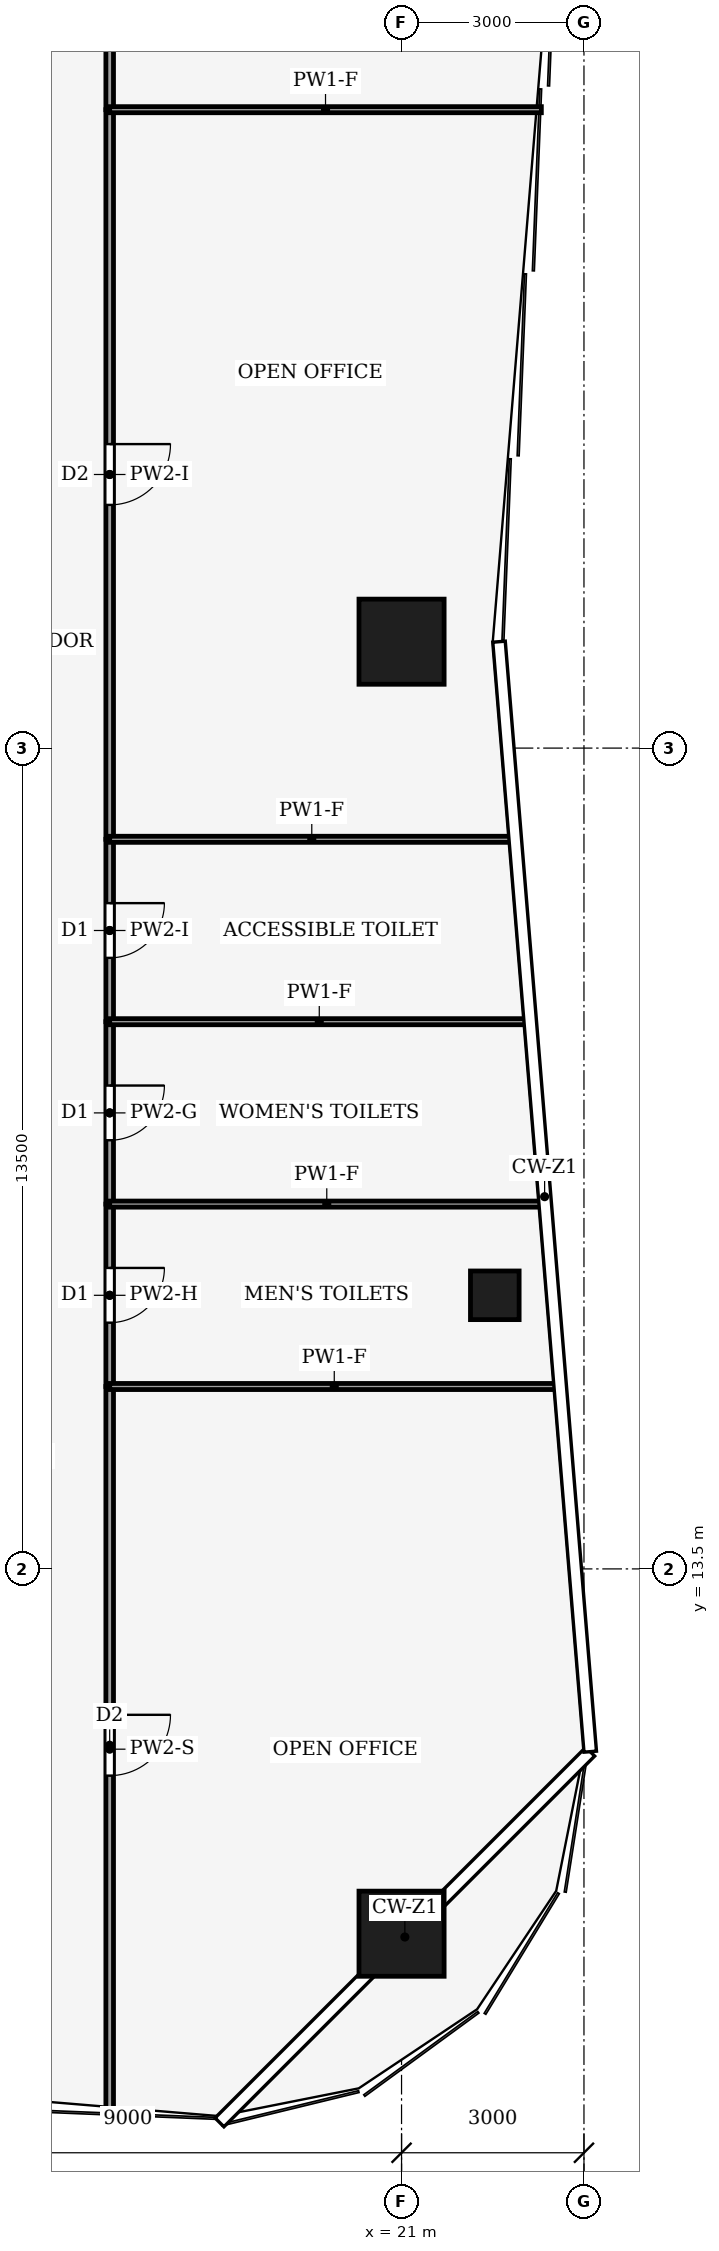
"""IFC4 building model, lengths in metres.
Left out: names, types, materials, properties, quantities, classifications, styles, units other than length and angle.
Written with IfcOpenShell. Run it as: python <this file> out.ifc"""

import sys

from ifc_helpers import new_model, si_unit, direction, frame, frame_2d, origin, origin_2d, place, context, subcontext, project, spatial, rectangle, hollow_rectangle, extrude, element, fill, save


model = new_model("IFC4")
c1 = context("Model", 3, precision=1e-05, world=origin(), true_north=direction((0.0, 1.0)))
c2 = subcontext(c1, "Body", "Model", "MODEL_VIEW")
j1 = project(units=[si_unit("LENGTHUNIT", "METRE"), si_unit("PLANEANGLEUNIT", "RADIAN")], contexts=[c1])
p1 = place(None, origin())
s1 = spatial("IfcSite", under=j1, at=p1, CompositionType="ELEMENT")
p2 = place(p1, origin())
s2 = spatial("IfcBuilding", under=s1, at=p2, CompositionType="ELEMENT")
p3 = place(p2, frame((0.0, 0.0, 78.0)))
s3 = spatial("IfcBuildingStorey", under=s2, at=p3, CompositionType="ELEMENT", Elevation=78.0)
for number, where, z_axis, x_axis in (
    (1, (21.0, 28.75, 0.0), (0.0, 0.0, 1.0), (1.0, 0.0, 0.0)),
    (2, (21.0, 7.5, 0.0), (0.0, 0.0, 1.0), (1.0, 0.0, 0.0)),
):
    element("IfcColumn", number, at=place(p3, frame(where, z_axis=z_axis, x_axis=x_axis)), inside=s3, PredefinedType="COLUMN", context=c2, shape_type="SweptSolid", body=[
        extrude(hollow_rectangle(XDim=1.4, YDim=1.4, WallThickness=0.08, at=origin_2d()), origin(), (0.0, 0.0, 1.0), 4.0),
    ])
p4 = place(p3, frame((22.534, 18.0, 0.0), z_axis=(0.0, 0.0, 1.0), x_axis=(1.0, 0.0, 0.0)))
e3 = element("IfcColumn", 3, at=p4, inside=s3, PredefinedType="COLUMN", context=c2, shape_type="SweptSolid", body=[
    extrude(hollow_rectangle(XDim=0.8, YDim=0.8, WallThickness=0.04, at=origin_2d()), origin(), (0.0, 0.0, 1.0), 4.0),
])
p5 = place(p3, frame((16.2, 16.5, 0.0), z_axis=(0.0, 0.0, 1.0), x_axis=(0.0, -1.0, 0.0)))
e4 = element("IfcWall", 4, at=p5, inside=s3, PredefinedType="PARTITIONING", context=c2, shape_type="SweptSolid", body=[
    extrude(rectangle(XDim=11.93, YDim=0.125, at=frame_2d((5.965, 0.0))), origin(), (0.0, 0.0, 1.0), 3.04),
])
p6 = place(p5, frame((5.4, 0.0, 0.0)))
e5 = element("IfcOpeningElement", 5, at=p6, cuts=e4, PredefinedType="OPENING", context=c2, shape_type="SweptSolid", body=[
    extrude(rectangle(XDim=1.0, YDim=2.1, at=frame_2d((0.5, 1.05))), frame((0.0, 0.073, 0.0), z_axis=(0.0, -1.0, 0.0), x_axis=(1.0, 0.0, 0.0)), (0.0, 0.0, 1.0), 0.145),
])
p7 = place(p3, frame((16.2, 19.5, 0.0), z_axis=(0.0, 0.0, 1.0), x_axis=(0.0, -1.0, 0.0)))
e6 = element("IfcWall", 6, at=p7, inside=s3, PredefinedType="PARTITIONING", context=c2, shape_type="SweptSolid", body=[
    extrude(rectangle(XDim=3.0, YDim=0.125, at=frame_2d((1.5, 0.0))), origin(), (0.0, 0.0, 1.0), 3.14),
])
p8 = place(p7, frame((1.05, 0.0, 0.0)))
e7 = element("IfcOpeningElement", 7, at=p8, cuts=e6, PredefinedType="OPENING", context=c2, shape_type="SweptSolid", body=[
    extrude(rectangle(XDim=0.9, YDim=2.1, at=frame_2d((0.45, 1.05))), frame((0.0, 0.073, 0.0), z_axis=(0.0, -1.0, 0.0), x_axis=(1.0, 0.0, 0.0)), (0.0, 0.0, 1.0), 0.145),
])
p9 = place(p3, frame((16.2, 22.5, 0.0), z_axis=(0.0, 0.0, 1.0), x_axis=(0.0, -1.0, 0.0)))
e8 = element("IfcWall", 8, at=p9, inside=s3, PredefinedType="PARTITIONING", context=c2, shape_type="SweptSolid", body=[
    extrude(rectangle(XDim=3.0, YDim=0.125, at=frame_2d((1.5, 0.0))), origin(), (0.0, 0.0, 1.0), 3.87),
])
p10 = place(p9, frame((1.05, 0.0, 0.0)))
e9 = element("IfcOpeningElement", 9, at=p10, cuts=e8, PredefinedType="OPENING", context=c2, shape_type="SweptSolid", body=[
    extrude(rectangle(XDim=0.9, YDim=2.1, at=frame_2d((0.45, 1.05))), frame((0.0, 0.073, 0.0), z_axis=(0.0, -1.0, 0.0), x_axis=(1.0, 0.0, 0.0)), (0.0, 0.0, 1.0), 0.145),
])
p11 = place(p3, frame((16.2, 25.5, 0.0), z_axis=(0.0, 0.0, 1.0), x_axis=(0.0, -1.0, 0.0)))
e10 = element("IfcWall", 10, at=p11, inside=s3, PredefinedType="PARTITIONING", context=c2, shape_type="SweptSolid", body=[
    extrude(rectangle(XDim=3.0, YDim=0.125, at=frame_2d((1.5, 0.0))), origin(), (0.0, 0.0, 1.0), 3.48),
])
p12 = place(p11, frame((1.05, 0.0, 0.0)))
e11 = element("IfcOpeningElement", 11, at=p12, cuts=e10, PredefinedType="OPENING", context=c2, shape_type="SweptSolid", body=[
    extrude(rectangle(XDim=0.9, YDim=2.1, at=frame_2d((0.45, 1.05))), frame((0.0, 0.073, 0.0), z_axis=(0.0, -1.0, 0.0), x_axis=(1.0, 0.0, 0.0)), (0.0, 0.0, 1.0), 0.145),
])
p13 = place(p3, frame((16.2, 37.5, 0.0), z_axis=(0.0, 0.0, 1.0), x_axis=(0.0, -1.0, 0.0)))
e12 = element("IfcWall", 12, at=p13, inside=s3, PredefinedType="PARTITIONING", context=c2, shape_type="SweptSolid", body=[
    extrude(rectangle(XDim=12.0, YDim=0.125, at=frame_2d((6.0, 0.0))), origin(), (0.0, 0.0, 1.0), 3.48),
])
p14 = place(p13, frame((5.5, 0.0, 0.0)))
e13 = element("IfcOpeningElement", 13, at=p14, cuts=e12, PredefinedType="OPENING", context=c2, shape_type="SweptSolid", body=[
    extrude(rectangle(XDim=1.0, YDim=2.1, at=frame_2d((0.5, 1.05))), frame((0.0, 0.073, 0.0), z_axis=(0.0, -1.0, 0.0), x_axis=(1.0, 0.0, 0.0)), (0.0, 0.0, 1.0), 0.145),
])
p15 = place(p3, frame((16.2, 46.5, 0.0), z_axis=(0.0, 0.0, 1.0), x_axis=(0.0, -1.0, 0.0)))
e14 = element("IfcWall", 14, at=p15, inside=s3, PredefinedType="PARTITIONING", context=c2, shape_type="SweptSolid", body=[
    extrude(rectangle(XDim=9.0, YDim=0.125, at=frame_2d((4.5, 0.0))), origin(), (0.0, 0.0, 1.0), 3.14),
])
p16 = place(p15, frame((4.0, 0.0, 0.0)))
e15 = element("IfcOpeningElement", 15, at=p16, cuts=e14, PredefinedType="OPENING", context=c2, shape_type="SweptSolid", body=[
    extrude(rectangle(XDim=1.0, YDim=2.1, at=frame_2d((0.5, 1.05))), frame((0.0, 0.073, 0.0), z_axis=(0.0, -1.0, 0.0), x_axis=(1.0, 0.0, 0.0)), (0.0, 0.0, 1.0), 0.145),
])
p17 = place(p3, frame((23.587, 16.5, 0.0), z_axis=(0.0, 0.0, 1.0), x_axis=(-1.0, 0.0, 0.0)))
e16 = element("IfcWall", 16, at=p17, inside=s3, PredefinedType="PARTITIONING", context=c2, shape_type="SweptSolid", body=[
    extrude(rectangle(XDim=7.387, YDim=0.1, at=frame_2d((3.693, 0.0))), origin(), (0.0, 0.0, 1.0), 3.04),
])
p18 = place(p3, frame((23.34, 19.5, 0.0), z_axis=(0.0, 0.0, 1.0), x_axis=(-1.0, 0.0, 0.0)))
e17 = element("IfcWall", 17, at=p18, inside=s3, PredefinedType="PARTITIONING", context=c2, shape_type="SweptSolid", body=[
    extrude(rectangle(XDim=7.14, YDim=0.1, at=frame_2d((3.57, 0.0))), origin(), (0.0, 0.0, 1.0), 3.04),
])
p19 = place(p3, frame((23.094, 22.5, 0.0), z_axis=(0.0, 0.0, 1.0), x_axis=(-1.0, 0.0, 0.0)))
e18 = element("IfcWall", 18, at=p19, inside=s3, PredefinedType="PARTITIONING", context=c2, shape_type="SweptSolid", body=[
    extrude(rectangle(XDim=6.894, YDim=0.1, at=frame_2d((3.447, 0.0))), origin(), (0.0, 0.0, 1.0), 3.04),
])
p20 = place(p3, frame((22.847, 25.5, 0.0), z_axis=(0.0, 0.0, 1.0), x_axis=(-1.0, 0.0, 0.0)))
e19 = element("IfcWall", 19, at=p20, inside=s3, PredefinedType="PARTITIONING", context=c2, shape_type="SweptSolid", body=[
    extrude(rectangle(XDim=6.647, YDim=0.1, at=frame_2d((3.324, 0.0))), origin(), (0.0, 0.0, 1.0), 3.04),
])
p21 = place(p3, frame((23.299, 37.5, 0.0), z_axis=(0.0, 0.0, 1.0), x_axis=(-1.0, 0.0, 0.0)))
e20 = element("IfcWall", 20, at=p21, inside=s3, PredefinedType="PARTITIONING", context=c2, shape_type="SweptSolid", body=[
    extrude(rectangle(XDim=7.099, YDim=0.1, at=frame_2d((3.55, 0.0))), origin(), (0.0, 0.0, 1.0), 3.04),
])
p22 = place(p6, origin())
e21 = element("IfcDoor", 21, at=p22, inside=s3, OperationType="SINGLE_SWING_LEFT", PredefinedType="DOOR", context=c2, shape_type="SweptSolid", body=[
    extrude(rectangle(XDim=1.0, YDim=2.1, at=frame_2d((0.5, 1.05))), frame((0.0, 0.025, 0.0), z_axis=(0.0, -1.0, 0.0), x_axis=(1.0, 0.0, 0.0)), (0.0, 0.0, 1.0), 0.05),
])
fill(e5, e21)
p23 = place(p8, origin())
e22 = element("IfcDoor", 22, at=p23, inside=s3, OperationType="SINGLE_SWING_RIGHT", PredefinedType="DOOR", context=c2, shape_type="SweptSolid", body=[
    extrude(rectangle(XDim=0.9, YDim=2.1, at=frame_2d((0.45, 1.05))), frame((0.0, 0.025, 0.0), z_axis=(0.0, -1.0, 0.0), x_axis=(1.0, 0.0, 0.0)), (0.0, 0.0, 1.0), 0.05),
])
fill(e7, e22)
p24 = place(p10, origin())
e23 = element("IfcDoor", 23, at=p24, inside=s3, OperationType="SINGLE_SWING_LEFT", PredefinedType="DOOR", context=c2, shape_type="SweptSolid", body=[
    extrude(rectangle(XDim=0.9, YDim=2.1, at=frame_2d((0.45, 1.05))), frame((0.0, 0.025, 0.0), z_axis=(0.0, -1.0, 0.0), x_axis=(1.0, 0.0, 0.0)), (0.0, 0.0, 1.0), 0.05),
])
fill(e9, e23)
p25 = place(p12, origin())
e24 = element("IfcDoor", 24, at=p25, inside=s3, OperationType="SINGLE_SWING_RIGHT", PredefinedType="DOOR", context=c2, shape_type="SweptSolid", body=[
    extrude(rectangle(XDim=0.9, YDim=2.1, at=frame_2d((0.45, 1.05))), frame((0.0, 0.025, 0.0), z_axis=(0.0, -1.0, 0.0), x_axis=(1.0, 0.0, 0.0)), (0.0, 0.0, 1.0), 0.05),
])
fill(e11, e24)
p26 = place(p14, origin())
e25 = element("IfcDoor", 25, at=p26, inside=s3, OperationType="SINGLE_SWING_LEFT", PredefinedType="DOOR", context=c2, shape_type="SweptSolid", body=[
    extrude(rectangle(XDim=1.0, YDim=2.1, at=frame_2d((0.5, 1.05))), frame((0.0, 0.025, 0.0), z_axis=(0.0, -1.0, 0.0), x_axis=(1.0, 0.0, 0.0)), (0.0, 0.0, 1.0), 0.05),
])
fill(e13, e25)
save(model, sys.argv[1])
